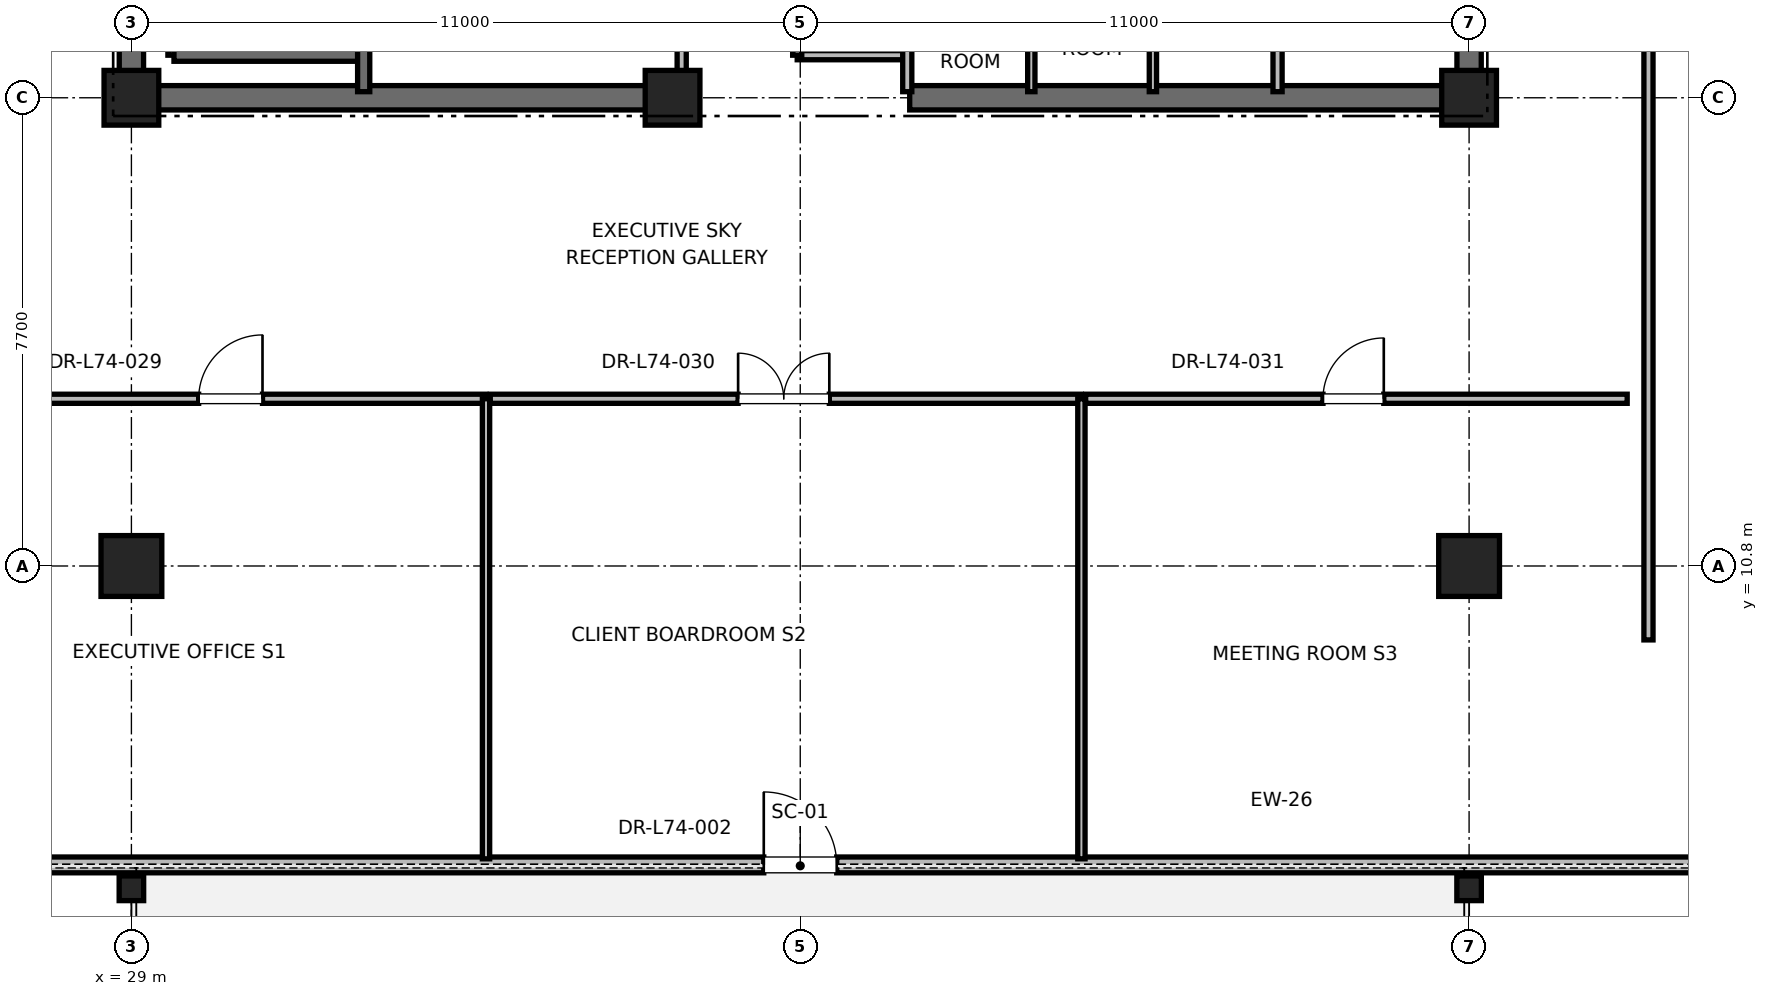
"""IFC4 building model, lengths in metres.
Left out: names, types, materials, properties, quantities, classifications, styles, units other than length and angle.
Written with IfcOpenShell. Run it as: python <this file> out.ifc"""

import sys

from ifc_helpers import new_model, si_unit, direction, frame, frame_2d, origin, origin_2d, place, context, subcontext, project, spatial, rectangle, i_section, extrude, element, fill, save


model = new_model("IFC4")
c1 = context("Model", 3, precision=1e-05, world=origin(), true_north=direction((0.0, 1.0)))
c2 = subcontext(c1, "Body", "Model", "MODEL_VIEW")
j1 = project(units=[si_unit("LENGTHUNIT", "METRE"), si_unit("PLANEANGLEUNIT", "RADIAN")], contexts=[c1])
p1 = place(None, origin())
s1 = spatial("IfcSite", under=j1, at=p1, CompositionType="ELEMENT")
p2 = place(p1, origin())
s2 = spatial("IfcBuilding", under=s1, at=p2, CompositionType="ELEMENT")
p3 = place(p2, frame((0.0, 0.0, 318.8)))
s3 = spatial("IfcBuildingStorey", under=s2, at=p3, CompositionType="ELEMENT", Elevation=318.8)
for number, where, z_axis, x_axis in (
    (1, (29.0, 10.8, 0.0), (0.0, 0.0, 1.0), (1.0, 0.0, 0.0)),
    (2, (51.0, 10.8, 0.0), (0.0, 0.0, 1.0), (1.0, 0.0, 0.0)),
):
    element("IfcColumn", number, at=place(p3, frame(where, z_axis=z_axis, x_axis=x_axis)), inside=s3, PredefinedType="COLUMN", context=c2, shape_type="SweptSolid", body=[
        extrude(rectangle(XDim=1.0, YDim=1.0, at=origin_2d()), origin(), (0.0, 0.0, 1.0), 4.0),
    ])
for number, where, z_axis, x_axis in (
    (3, (29.0, 5.5, 0.0), (0.0, 0.0, 1.0), (1.0, 0.0, 0.0)),
    (4, (51.0, 5.5, 0.0), (0.0, 0.0, 1.0), (1.0, 0.0, 0.0)),
):
    element("IfcColumn", number, at=place(p3, frame(where, z_axis=z_axis, x_axis=x_axis)), inside=s3, PredefinedType="COLUMN", context=c2, shape_type="SweptSolid", body=[
        extrude(i_section(OverallWidth=0.403, OverallDepth=0.406, WebThickness=0.027, FlangeThickness=0.043, FilletRadius=0.015, at=origin_2d()), origin(), (0.0, 0.0, 1.0), 4.0),
    ])
for number, where, z_axis, x_axis in (
    (5, (29.0, 18.5, 0.0), (0.0, 0.0, 1.0), (1.0, 0.0, 0.0)),
    (6, (51.0, 18.5, 0.0), (0.0, 0.0, 1.0), (1.0, 0.0, 0.0)),
    (7, (37.9, 18.5, 0.0), (0.0, 0.0, 1.0), (1.0, 0.0, 0.0)),
):
    element("IfcColumn", number, at=place(p3, frame(where, z_axis=z_axis, x_axis=x_axis)), inside=s3, PredefinedType="PILASTER", context=c2, shape_type="SweptSolid", body=[
        extrude(rectangle(XDim=0.9, YDim=0.9, at=origin_2d()), origin(), (0.0, 0.0, 1.0), 4.0),
    ])
for number, where, z_axis, x_axis in (
    (8, (29.0, 18.5, 0.0), (0.0, 0.0, 1.0), (1.0, 0.0, 0.0)),
    (9, (41.8, 18.5, 0.0), (0.0, 0.0, 1.0), (1.0, 0.0, 0.0)),
):
    element("IfcWall", number, at=place(p3, frame(where, z_axis=z_axis, x_axis=x_axis)), inside=s3, PredefinedType="SHEAR", context=c2, shape_type="SweptSolid", body=[
        extrude(rectangle(XDim=9.2, YDim=0.4, at=frame_2d((4.6, 0.0))), origin(), (0.0, 0.0, 1.0), 3.785),
    ])
p4 = place(p3, frame((29.0, 18.5, 0.0), z_axis=(0.0, 0.0, 1.0), x_axis=(0.0, 1.0, 0.0)))
e10 = element("IfcWall", 10, at=p4, inside=s3, PredefinedType="SHEAR", context=c2, shape_type="SweptSolid", body=[
    extrude(rectangle(XDim=8.8, YDim=0.4, at=frame_2d((4.4, 0.0))), origin(), (0.0, 0.0, 1.0), 3.785),
])
p5 = place(p3, frame((51.0, 18.5, 0.0), z_axis=(0.0, 0.0, 1.0), x_axis=(0.0, 1.0, 0.0)))
e11 = element("IfcWall", 11, at=p5, inside=s3, PredefinedType="SHEAR", context=c2, shape_type="SweptSolid", body=[
    extrude(rectangle(XDim=5.8, YDim=0.4, at=frame_2d((2.9, 0.0))), origin(), (0.0, 0.0, 1.0), 3.785),
])
p6 = place(p3, frame((18.969, 5.884, 0.0), z_axis=(0.0, 0.0, 1.0), x_axis=(1.0, 0.0, 0.0)))
e12 = element("IfcWall", 12, at=p6, inside=s3, PredefinedType="PARAPET", context=c2, shape_type="SweptSolid", body=[
    extrude(rectangle(XDim=42.063, YDim=0.26, at=frame_2d((21.031, 0.0))), origin(), (0.0, 0.0, 1.0), 3.196),
])
p7 = place(p6, frame((4.2, 0.0, 0.85)))
e13 = element("IfcOpeningElement", 13, at=p7, cuts=e12, PredefinedType="OPENING", context=c2, shape_type="SweptSolid", body=[
    extrude(rectangle(XDim=1.6, YDim=2.1, at=frame_2d((0.8, 1.05))), frame((0.0, 0.13, 0.0), z_axis=(0.0, -1.0, 0.0), x_axis=(1.0, 0.0, 0.0)), (0.0, 0.0, 1.0), 0.26),
])
p8 = place(p6, frame((20.431, 0.0, 0.0)))
e14 = element("IfcOpeningElement", 14, at=p8, cuts=e12, PredefinedType="OPENING", context=c2, shape_type="SweptSolid", body=[
    extrude(rectangle(XDim=1.2, YDim=2.2, at=frame_2d((0.6, 1.1))), frame((0.0, 0.13, 0.0), z_axis=(0.0, -1.0, 0.0), x_axis=(1.0, 0.0, 0.0)), (0.0, 0.0, 1.0), 0.26),
])
p9 = place(p6, frame((36.263, 0.0, 0.85)))
e15 = element("IfcOpeningElement", 15, at=p9, cuts=e12, PredefinedType="OPENING", context=c2, shape_type="SweptSolid", body=[
    extrude(rectangle(XDim=1.6, YDim=2.1, at=frame_2d((0.8, 1.05))), frame((0.0, 0.13, 0.0), z_axis=(0.0, -1.0, 0.0), x_axis=(1.0, 0.0, 0.0)), (0.0, 0.0, 1.0), 0.26),
])
p10 = place(p3, frame((29.7, 19.2, 0.0), z_axis=(0.0, 0.0, 1.0), x_axis=(0.0, 1.0, 0.0)))
e16 = element("IfcWall", 16, at=p10, inside=s3, PredefinedType="SOLIDWALL", context=c2, shape_type="SweptSolid", body=[
    extrude(rectangle(XDim=8.15, YDim=0.2, at=frame_2d((4.075, 0.0))), origin(), (0.0, 0.0, 1.0), 3.785),
])
p11 = place(p3, frame((29.7, 19.2, 0.0), z_axis=(0.0, 0.0, 1.0), x_axis=(1.0, 0.0, 0.0)))
e17 = element("IfcWall", 17, at=p11, inside=s3, PredefinedType="SOLIDWALL", context=c2, shape_type="SweptSolid", body=[
    extrude(rectangle(XDim=3.12, YDim=0.2, at=frame_2d((1.56, 0.0))), origin(), (0.0, 0.0, 1.0), 3.785),
])
p12 = place(p3, frame((32.82, 18.6, 0.0), z_axis=(0.0, 0.0, 1.0), x_axis=(0.0, 1.0, 0.0)))
e18 = element("IfcWall", 18, at=p12, inside=s3, PredefinedType="SOLIDWALL", context=c2, shape_type="SweptSolid", body=[
    extrude(rectangle(XDim=8.78, YDim=0.2, at=frame_2d((4.39, 0.0))), origin(), (0.0, 0.0, 1.0), 3.785),
])
p13 = place(p3, frame((39.95, 19.2, 0.0), z_axis=(0.0, 0.0, 1.0), x_axis=(1.0, 0.0, 0.0)))
e19 = element("IfcWall", 19, at=p13, inside=s3, PredefinedType="PARTITIONING", context=c2, shape_type="SweptSolid", body=[
    extrude(rectangle(XDim=1.81, YDim=0.15, at=frame_2d((0.905, 0.0))), origin(), (0.0, 0.0, 1.0), 2.85),
])
p14 = place(p3, frame((41.76, 18.6, 0.0), z_axis=(0.0, 0.0, 1.0), x_axis=(0.0, 1.0, 0.0)))
e20 = element("IfcWall", 20, at=p14, inside=s3, PredefinedType="PARTITIONING", context=c2, shape_type="SweptSolid", body=[
    extrude(rectangle(XDim=3.6, YDim=0.15, at=frame_2d((1.8, 0.0))), origin(), (0.0, 0.0, 1.0), 2.85),
])
p15 = place(p3, frame((39.95, 19.2, 0.0), z_axis=(0.0, 0.0, 1.0), x_axis=(0.0, 1.0, 0.0)))
e21 = element("IfcWall", 21, at=p15, inside=s3, PredefinedType="PARTITIONING", context=c2, shape_type="SweptSolid", body=[
    extrude(rectangle(XDim=3.0, YDim=0.15, at=frame_2d((1.5, 0.0))), origin(), (0.0, 0.0, 1.0), 2.85),
])
p16 = place(p15, frame((1.05, 0.0, 0.0)))
e22 = element("IfcOpeningElement", 22, at=p16, cuts=e21, PredefinedType="OPENING", context=c2, shape_type="SweptSolid", body=[
    extrude(rectangle(XDim=0.9, YDim=2.1, at=frame_2d((0.45, 1.05))), frame((0.0, 0.075, 0.0), z_axis=(0.0, -1.0, 0.0), x_axis=(1.0, 0.0, 0.0)), (0.0, 0.0, 1.0), 0.15),
])
p17 = place(p3, frame((38.05, 18.6, 0.0), z_axis=(0.0, 0.0, 1.0), x_axis=(0.0, 1.0, 0.0)))
e23 = element("IfcWall", 23, at=p17, inside=s3, PredefinedType="PARTITIONING", context=c2, shape_type="SweptSolid", body=[
    extrude(rectangle(XDim=3.06, YDim=0.15, at=frame_2d((1.53, 0.0))), origin(), (0.0, 0.0, 1.0), 2.85),
])
p18 = place(p17, frame((1.03, 0.0, 0.0)))
e24 = element("IfcOpeningElement", 24, at=p18, cuts=e23, PredefinedType="OPENING", context=c2, shape_type="SweptSolid", body=[
    extrude(rectangle(XDim=1.0, YDim=2.15, at=frame_2d((0.5, 1.075))), frame((0.0, 0.075, 0.0), z_axis=(0.0, -1.0, 0.0), x_axis=(1.0, 0.0, 0.0)), (0.0, 0.0, 1.0), 0.15),
])
p19 = place(p3, frame((47.85, 18.6, 0.0), z_axis=(0.0, 0.0, 1.0), x_axis=(0.0, 1.0, 0.0)))
e25 = element("IfcWall", 25, at=p19, inside=s3, PredefinedType="PARTITIONING", context=c2, shape_type="SweptSolid", body=[
    extrude(rectangle(XDim=2.54, YDim=0.15, at=frame_2d((1.27, 0.0))), origin(), (0.0, 0.0, 1.0), 2.85),
])
for number, where, z_axis, x_axis in (
    (26, (43.8, 18.6, 0.0), (0.0, 0.0, 1.0), (0.0, 1.0, 0.0)),
    (27, (45.8, 18.6, 0.0), (0.0, 0.0, 1.0), (0.0, 1.0, 0.0)),
):
    element("IfcWall", number, at=place(p3, frame(where, z_axis=z_axis, x_axis=x_axis)), inside=s3, PredefinedType="PARTITIONING", context=c2, shape_type="SweptSolid", body=[
        extrude(rectangle(XDim=3.02, YDim=0.12, at=frame_2d((1.51, 0.0))), origin(), (0.0, 0.0, 1.0), 2.85),
    ])
p20 = place(p3, frame((26.4, 13.55, 0.0), z_axis=(0.0, 0.0, 1.0), x_axis=(1.0, 0.0, 0.0)))
e28 = element("IfcWall", 28, at=p20, inside=s3, PredefinedType="PARTITIONING", context=c2, shape_type="SweptSolid", body=[
    extrude(rectangle(XDim=8.432, YDim=0.15, at=frame_2d((4.216, 0.0))), origin(), (0.0, 0.0, 1.0), 2.85),
])
p21 = place(p20, frame((3.706, 0.0, 0.0)))
e29 = element("IfcOpeningElement", 29, at=p21, cuts=e28, PredefinedType="OPENING", context=c2, shape_type="SweptSolid", body=[
    extrude(rectangle(XDim=1.05, YDim=2.2, at=frame_2d((0.525, 1.1))), frame((0.0, 0.075, 0.0), z_axis=(0.0, -1.0, 0.0), x_axis=(1.0, 0.0, 0.0)), (0.0, 0.0, 1.0), 0.15),
])
p22 = place(p3, frame((34.832, 5.984, 0.0), z_axis=(0.0, 0.0, 1.0), x_axis=(0.0, 1.0, 0.0)))
e30 = element("IfcWall", 30, at=p22, inside=s3, PredefinedType="PARTITIONING", context=c2, shape_type="SweptSolid", body=[
    extrude(rectangle(XDim=7.566, YDim=0.12, at=frame_2d((3.783, 0.0))), origin(), (0.0, 0.0, 1.0), 2.415),
])
p23 = place(p3, frame((34.902, 13.55, 0.0), z_axis=(0.0, 0.0, 1.0), x_axis=(1.0, 0.0, 0.0)))
e31 = element("IfcWall", 31, at=p23, inside=s3, PredefinedType="PARTITIONING", context=c2, shape_type="SweptSolid", body=[
    extrude(rectangle(XDim=9.722, YDim=0.15, at=frame_2d((4.861, 0.0))), origin(), (0.0, 0.0, 1.0), 2.85),
])
p24 = place(p23, frame((4.076, 0.0, 0.0)))
e32 = element("IfcOpeningElement", 32, at=p24, cuts=e31, PredefinedType="OPENING", context=c2, shape_type="SweptSolid", body=[
    extrude(rectangle(XDim=1.5, YDim=2.25, at=frame_2d((0.75, 1.125))), frame((0.0, 0.075, 0.0), z_axis=(0.0, -1.0, 0.0), x_axis=(1.0, 0.0, 0.0)), (0.0, 0.0, 1.0), 0.15),
])
p25 = place(p3, frame((44.624, 5.984, 0.0), z_axis=(0.0, 0.0, 1.0), x_axis=(0.0, 1.0, 0.0)))
e33 = element("IfcWall", 33, at=p25, inside=s3, PredefinedType="PARTITIONING", context=c2, shape_type="SweptSolid", body=[
    extrude(rectangle(XDim=7.566, YDim=0.12, at=frame_2d((3.783, 0.0))), origin(), (0.0, 0.0, 1.0), 2.415),
])
p26 = place(p3, frame((44.694, 13.55, 0.0), z_axis=(0.0, 0.0, 1.0), x_axis=(1.0, 0.0, 0.0)))
e34 = element("IfcWall", 34, at=p26, inside=s3, PredefinedType="PARTITIONING", context=c2, shape_type="SweptSolid", body=[
    extrude(rectangle(XDim=8.906, YDim=0.15, at=frame_2d((4.453, 0.0))), origin(), (0.0, 0.0, 1.0), 2.85),
])
p27 = place(p26, frame((3.903, 0.0, 0.0)))
e35 = element("IfcOpeningElement", 35, at=p27, cuts=e34, PredefinedType="OPENING", context=c2, shape_type="SweptSolid", body=[
    extrude(rectangle(XDim=1.0, YDim=2.15, at=frame_2d((0.5, 1.075))), frame((0.0, 0.075, 0.0), z_axis=(0.0, -1.0, 0.0), x_axis=(1.0, 0.0, 0.0)), (0.0, 0.0, 1.0), 0.15),
])
p28 = place(p3, frame((53.95, 9.584, 0.0), z_axis=(0.0, 0.0, 1.0), x_axis=(0.0, 1.0, 0.0)))
e36 = element("IfcWall", 36, at=p28, inside=s3, PredefinedType="PARTITIONING", context=c2, shape_type="SweptSolid", body=[
    extrude(rectangle(XDim=15.049, YDim=0.15, at=frame_2d((7.525, 0.0))), origin(), (0.0, 0.0, 1.0), 2.85),
])
p29 = place(p28, frame((11.497, 0.0, 0.0)))
e37 = element("IfcOpeningElement", 37, at=p29, cuts=e36, PredefinedType="OPENING", context=c2, shape_type="SweptSolid", body=[
    extrude(rectangle(XDim=1.0, YDim=2.15, at=frame_2d((0.5, 1.075))), frame((0.0, 0.075, 0.0), z_axis=(0.0, -1.0, 0.0), x_axis=(1.0, 0.0, 0.0)), (0.0, 0.0, 1.0), 0.15),
])
p30 = place(p8, origin())
e38 = element("IfcDoor", 38, at=p30, inside=s3, OperationType="SINGLE_SWING_LEFT", PredefinedType="DOOR", context=c2, shape_type="SweptSolid", body=[
    extrude(rectangle(XDim=1.2, YDim=2.2, at=frame_2d((0.6, 1.1))), frame((0.0, 0.025, 0.0), z_axis=(0.0, -1.0, 0.0), x_axis=(1.0, 0.0, 0.0)), (0.0, 0.0, 1.0), 0.05),
])
fill(e14, e38)
p31 = place(p21, origin())
e39 = element("IfcDoor", 39, at=p31, inside=s3, OperationType="SINGLE_SWING_RIGHT", PredefinedType="DOOR", context=c2, shape_type="SweptSolid", body=[
    extrude(rectangle(XDim=1.05, YDim=2.2, at=frame_2d((0.525, 1.1))), frame((0.0, 0.025, 0.0), z_axis=(0.0, -1.0, 0.0), x_axis=(1.0, 0.0, 0.0)), (0.0, 0.0, 1.0), 0.05),
])
fill(e29, e39)
p32 = place(p24, origin())
e40 = element("IfcDoor", 40, at=p32, inside=s3, OperationType="DOUBLE_DOOR_SINGLE_SWING", PredefinedType="DOOR", context=c2, shape_type="SweptSolid", body=[
    extrude(rectangle(XDim=1.5, YDim=2.25, at=frame_2d((0.75, 1.125))), frame((0.0, 0.025, 0.0), z_axis=(0.0, -1.0, 0.0), x_axis=(1.0, 0.0, 0.0)), (0.0, 0.0, 1.0), 0.05),
])
fill(e32, e40)
p33 = place(p27, origin())
e41 = element("IfcDoor", 41, at=p33, inside=s3, OperationType="SINGLE_SWING_RIGHT", PredefinedType="DOOR", context=c2, shape_type="SweptSolid", body=[
    extrude(rectangle(XDim=1.0, YDim=2.15, at=frame_2d((0.5, 1.075))), frame((0.0, 0.025, 0.0), z_axis=(0.0, -1.0, 0.0), x_axis=(1.0, 0.0, 0.0)), (0.0, 0.0, 1.0), 0.05),
])
fill(e35, e41)
save(model, sys.argv[1])
